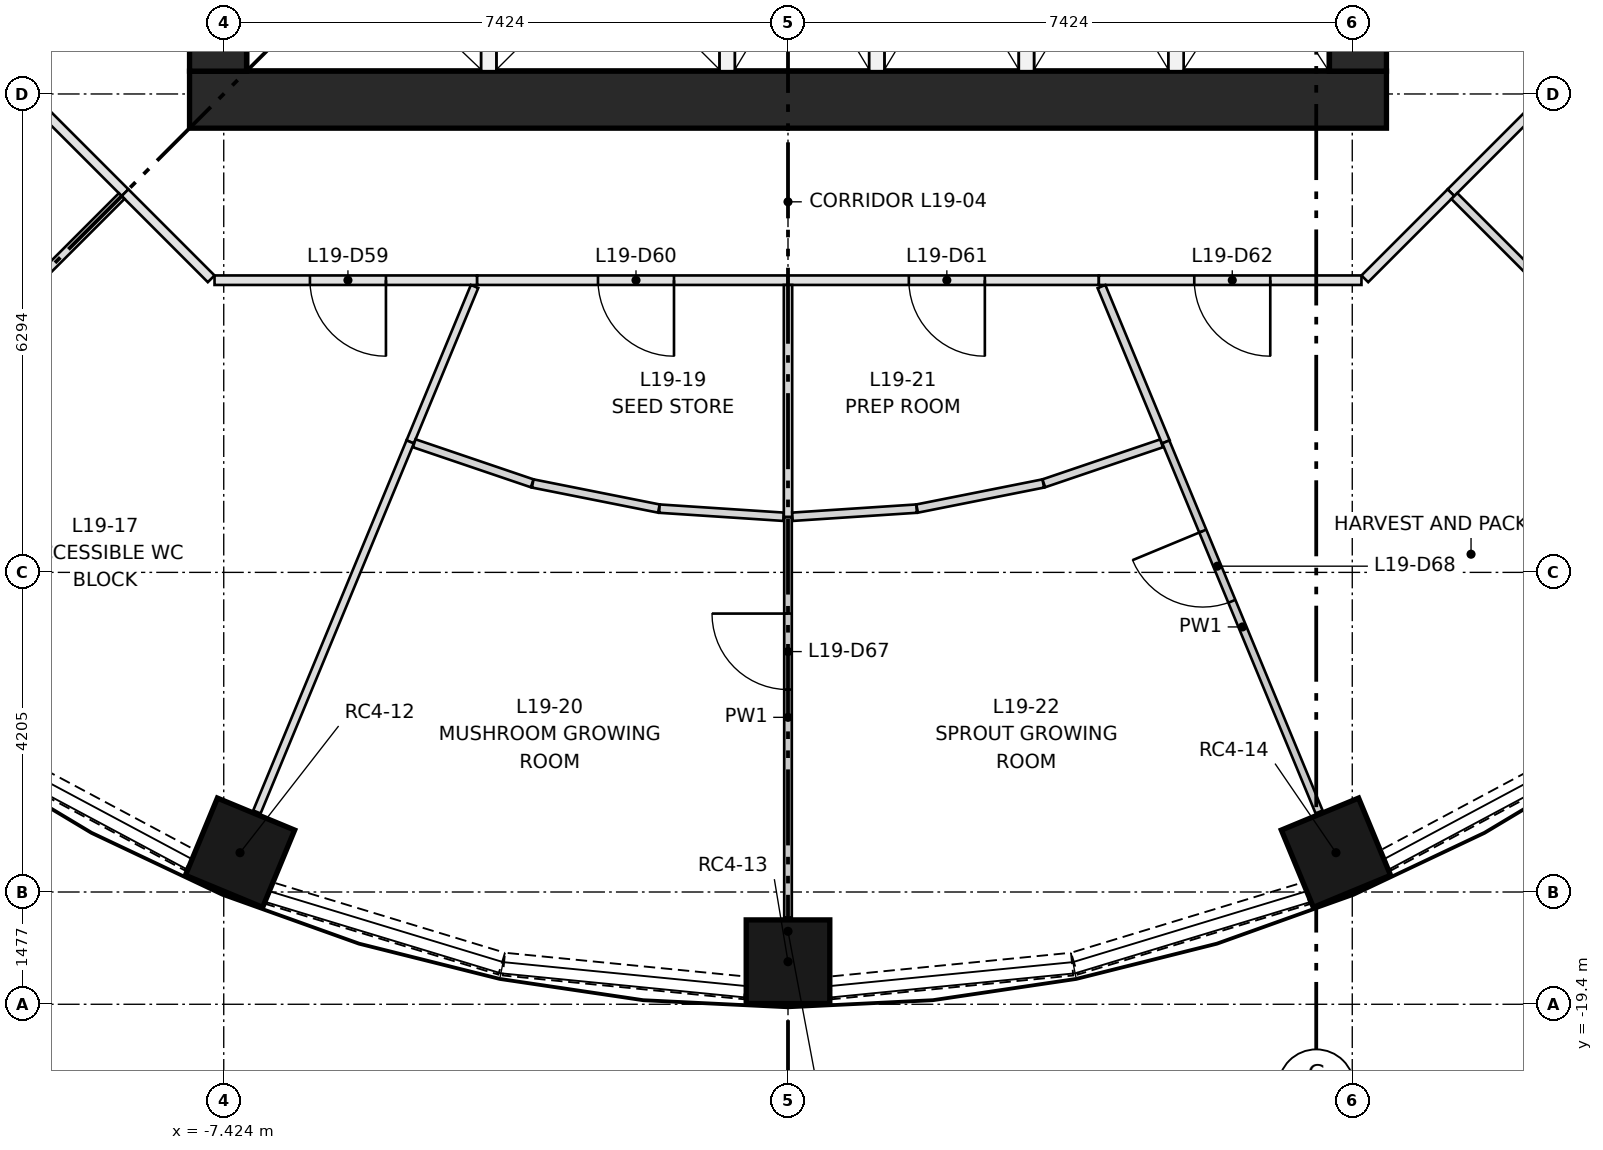
"""IFC4 building model, lengths in metres.
Left out: names, types, materials, properties, quantities, classifications, styles, units other than length and angle.
Written with IfcOpenShell. Run it as: python <this file> out.ifc"""

import sys

from ifc_helpers import new_model, si_unit, direction, frame, frame_2d, origin, origin_2d, place, context, subcontext, project, spatial, rectangle, extrude, element, fill, save


model = new_model("IFC4")
c1 = context("Model", 3, precision=1e-05, world=origin(), true_north=direction((0.0, 1.0)))
c2 = subcontext(c1, "Body", "Model", "MODEL_VIEW")
j1 = project(units=[si_unit("LENGTHUNIT", "METRE"), si_unit("PLANEANGLEUNIT", "RADIAN")], contexts=[c1])
p1 = place(None, origin())
s1 = spatial("IfcSite", under=j1, at=p1, CompositionType="ELEMENT")
p2 = place(p1, origin())
s2 = spatial("IfcBuilding", under=s1, at=p2, CompositionType="ELEMENT")
p3 = place(p2, frame((0.0, 0.0, 76.4)))
s3 = spatial("IfcBuildingStorey", under=s2, at=p3, CompositionType="ELEMENT", Elevation=76.4)
for number, where, z_axis, x_axis in (
    (1, (-7.21, -17.406, 0.0), (0.0, 0.0, 1.0), (-0.383, -0.924, 0.0)),
    (2, (0.0, -18.84, 0.0), (0.0, 0.0, 1.0), (0.0, -1.0, 0.0)),
    (3, (7.21, -17.406, 0.0), (0.0, 0.0, 1.0), (0.383, -0.924, 0.0)),
):
    element("IfcColumn", number, at=place(p3, frame(where, z_axis=z_axis, x_axis=x_axis)), inside=s3, PredefinedType="COLUMN", context=c2, shape_type="SweptSolid", body=[
        extrude(rectangle(XDim=1.1, YDim=1.1, at=origin_2d()), origin(), (0.0, 0.0, 1.0), 3.65),
    ])
p4 = place(p3, frame((-7.874, -7.499, 0.0), z_axis=(0.0, 0.0, 1.0), x_axis=(1.0, 0.0, 0.0)))
e4 = element("IfcWall", 4, at=p4, inside=s3, PredefinedType="SHEAR", context=c2, shape_type="SweptSolid", body=[
    extrude(rectangle(XDim=15.748, YDim=0.75, at=frame_2d((7.874, 0.0))), origin(), (0.0, 0.0, 1.0), 3.65),
])
p5 = place(p3, frame((-7.499, -7.124, 0.0), z_axis=(0.0, 0.0, 1.0), x_axis=(0.0, 1.0, 0.0)))
e5 = element("IfcWall", 5, at=p5, inside=s3, PredefinedType="SHEAR", context=c2, shape_type="SweptSolid", body=[
    extrude(rectangle(XDim=14.248, YDim=0.75, at=frame_2d((7.124, 0.0))), origin(), (0.0, 0.0, 1.0), 3.65),
])
p6 = place(p5, frame((6.624, 0.0, 0.0)))
e6 = element("IfcOpeningElement", 6, at=p6, cuts=e5, PredefinedType="OPENING", context=c2, shape_type="SweptSolid", body=[
    extrude(rectangle(XDim=1.0, YDim=2.1, at=frame_2d((0.5, 1.05))), frame((0.0, 0.385, 0.0), z_axis=(0.0, -1.0, 0.0), x_axis=(1.0, 0.0, 0.0)), (0.0, 0.0, 1.0), 0.77),
])
p7 = place(p5, frame((3.5, 0.0, 0.0)))
e7 = element("IfcOpeningElement", 7, at=p7, cuts=e5, PredefinedType="OPENING", context=c2, shape_type="SweptSolid", body=[
    extrude(rectangle(XDim=1.8, YDim=2.1, at=frame_2d((0.9, 1.05))), frame((0.0, 0.385, 0.0), z_axis=(0.0, -1.0, 0.0), x_axis=(1.0, 0.0, 0.0)), (0.0, 0.0, 1.0), 0.77),
])
p8 = place(p5, frame((8.948, 0.0, 0.0)))
e8 = element("IfcOpeningElement", 8, at=p8, cuts=e5, PredefinedType="OPENING", context=c2, shape_type="SweptSolid", body=[
    extrude(rectangle(XDim=1.8, YDim=2.1, at=frame_2d((0.9, 1.05))), frame((0.0, 0.385, 0.0), z_axis=(0.0, -1.0, 0.0), x_axis=(1.0, 0.0, 0.0)), (0.0, 0.0, 1.0), 0.77),
])
p9 = place(p5, frame((12.124, 0.0, 0.0)))
e9 = element("IfcOpeningElement", 9, at=p9, cuts=e5, PredefinedType="OPENING", context=c2, shape_type="SweptSolid", body=[
    extrude(rectangle(XDim=1.0, YDim=2.1, at=frame_2d((0.5, 1.05))), frame((0.0, 0.385, 0.0), z_axis=(0.0, -1.0, 0.0), x_axis=(1.0, 0.0, 0.0)), (0.0, 0.0, 1.0), 0.77),
])
p10 = place(p3, frame((7.499, -7.124, 0.0), z_axis=(0.0, 0.0, 1.0), x_axis=(0.0, 1.0, 0.0)))
e10 = element("IfcWall", 10, at=p10, inside=s3, PredefinedType="SHEAR", context=c2, shape_type="SweptSolid", body=[
    extrude(rectangle(XDim=14.248, YDim=0.75, at=frame_2d((7.124, 0.0))), origin(), (0.0, 0.0, 1.0), 3.65),
])
p11 = place(p10, frame((6.624, 0.0, 0.0)))
e11 = element("IfcOpeningElement", 11, at=p11, cuts=e10, PredefinedType="OPENING", context=c2, shape_type="SweptSolid", body=[
    extrude(rectangle(XDim=1.0, YDim=2.1, at=frame_2d((0.5, 1.05))), frame((0.0, 0.385, 0.0), z_axis=(0.0, -1.0, 0.0), x_axis=(1.0, 0.0, 0.0)), (0.0, 0.0, 1.0), 0.77),
])
p12 = place(p10, frame((3.5, 0.0, 0.0)))
e12 = element("IfcOpeningElement", 12, at=p12, cuts=e10, PredefinedType="OPENING", context=c2, shape_type="SweptSolid", body=[
    extrude(rectangle(XDim=1.8, YDim=2.1, at=frame_2d((0.9, 1.05))), frame((0.0, 0.385, 0.0), z_axis=(0.0, -1.0, 0.0), x_axis=(1.0, 0.0, 0.0)), (0.0, 0.0, 1.0), 0.77),
])
p13 = place(p10, frame((8.948, 0.0, 0.0)))
e13 = element("IfcOpeningElement", 13, at=p13, cuts=e10, PredefinedType="OPENING", context=c2, shape_type="SweptSolid", body=[
    extrude(rectangle(XDim=1.8, YDim=2.1, at=frame_2d((0.9, 1.05))), frame((0.0, 0.385, 0.0), z_axis=(0.0, -1.0, 0.0), x_axis=(1.0, 0.0, 0.0)), (0.0, 0.0, 1.0), 0.77),
])
for number, where, z_axis, x_axis in (
    (14, (-3.937, -7.124, 0.0), (0.0, 0.0, 1.0), (0.0, 1.0, 0.0)),
    (15, (-0.8, -7.124, 0.0), (0.0, 0.0, 1.0), (0.0, 1.0, 0.0)),
    (16, (1.168, -7.124, 0.0), (0.0, 0.0, 1.0), (0.0, 1.0, 0.0)),
    (17, (3.137, -7.124, 0.0), (0.0, 0.0, 1.0), (0.0, 1.0, 0.0)),
    (18, (5.105, -7.124, 0.0), (0.0, 0.0, 1.0), (0.0, 1.0, 0.0)),
):
    element("IfcWall", number, at=place(p3, frame(where, z_axis=z_axis, x_axis=x_axis)), inside=s3, PredefinedType="PARTITIONING", context=c2, shape_type="SweptSolid", body=[
        extrude(rectangle(XDim=2.95, YDim=0.2, at=frame_2d((1.475, 0.0))), origin(), (0.0, 0.0, 1.0), 3.3),
    ])
p14 = place(p3, frame((-10.676, -16.004, 0.0), z_axis=(0.0, 0.0, 1.0), x_axis=(0.8819437364, -0.471354692163, 0.0)))
e19 = element("IfcWall", 19, at=p14, inside=s3, PredefinedType="SOLIDWALL", context=c2, shape_type="SweptSolid", body=[
    extrude(rectangle(XDim=3.19, YDim=0.3, at=frame_2d((1.595, 0.0))), origin(), (0.0, 0.0, 1.0), 0.9),
])
p15 = place(p3, frame((-6.821, -17.939, 0.0), z_axis=(0.0, 0.0, 1.0), x_axis=(0.956954228099, -0.290238876314, 0.0)))
e20 = element("IfcWall", 20, at=p15, inside=s3, PredefinedType="SOLIDWALL", context=c2, shape_type="SweptSolid", body=[
    extrude(rectangle(XDim=3.191, YDim=0.3, at=frame_2d((1.595, 0.0))), origin(), (0.0, 0.0, 1.0), 0.9),
])
for number, where, z_axis, x_axis in (
    (21, (-3.738, -18.872, 0.0), (0.0, 0.0, 1.0), (0.995, -0.098, 0.0)),
    (22, (0.564, -19.185, 0.0), (0.0, 0.0, 1.0), (0.995, 0.098, 0.0)),
):
    element("IfcWall", number, at=place(p3, frame(where, z_axis=z_axis, x_axis=x_axis)), inside=s3, PredefinedType="SOLIDWALL", context=c2, shape_type="SweptSolid", body=[
        extrude(rectangle(XDim=3.189, YDim=0.3, at=frame_2d((1.595, 0.0))), origin(), (0.0, 0.0, 1.0), 0.9),
    ])
p16 = place(p3, frame((3.767, -18.865, 0.0), z_axis=(0.0, 0.0, 1.0), x_axis=(0.956954228099, 0.290238876314, 0.0)))
e23 = element("IfcWall", 23, at=p16, inside=s3, PredefinedType="SOLIDWALL", context=c2, shape_type="SweptSolid", body=[
    extrude(rectangle(XDim=3.191, YDim=0.3, at=frame_2d((1.595, 0.0))), origin(), (0.0, 0.0, 1.0), 0.9),
])
p17 = place(p3, frame((7.862, -17.508, 0.0), z_axis=(0.0, 0.0, 1.0), x_axis=(0.8819437364, 0.471354692163, 0.0)))
e24 = element("IfcWall", 24, at=p17, inside=s3, PredefinedType="SOLIDWALL", context=c2, shape_type="SweptSolid", body=[
    extrude(rectangle(XDim=3.19, YDim=0.3, at=frame_2d((1.595, 0.0))), origin(), (0.0, 0.0, 1.0), 0.9),
])
for number, where, z_axis, x_axis in (
    (25, (9.856, -7.589, 0.0), (0.0, 0.0, 1.0), (-0.707, -0.707, 0.0)),
    (26, (-8.722, -8.722, 0.0), (0.0, 0.0, 1.0), (-0.707, 0.707, 0.0)),
    (27, (-7.589, -9.856, 0.0), (0.0, 0.0, 1.0), (-0.707, 0.707, 0.0)),
):
    element("IfcWall", number, at=place(p3, frame(where, z_axis=z_axis, x_axis=x_axis)), inside=s3, PredefinedType="PARTITIONING", context=c2, shape_type="SweptSolid", body=[
        extrude(rectangle(XDim=1.603, YDim=0.125, at=frame_2d((0.801, 0.0))), origin(), (0.0, 0.0, 1.0), 3.3),
    ])
p18 = place(p3, frame((-4.09, -9.874, 0.0), z_axis=(0.0, 0.0, 1.0), x_axis=(-1.0, 0.0, 0.0)))
e28 = element("IfcWall", 28, at=p18, inside=s3, PredefinedType="PARTITIONING", context=c2, shape_type="SweptSolid", body=[
    extrude(rectangle(XDim=3.455, YDim=0.125, at=frame_2d((1.728, 0.0))), origin(), (0.0, 0.0, 1.0), 3.3),
])
p19 = place(p18, frame((1.2, 0.0, 0.0)))
e29 = element("IfcOpeningElement", 29, at=p19, cuts=e28, PredefinedType="OPENING", context=c2, shape_type="SweptSolid", body=[
    extrude(rectangle(XDim=1.0, YDim=2.1, at=frame_2d((0.5, 1.05))), frame((0.0, 0.073, 0.0), z_axis=(0.0, -1.0, 0.0), x_axis=(1.0, 0.0, 0.0)), (0.0, 0.0, 1.0), 0.145),
])
p20 = place(p3, frame((0.0, -9.874, 0.0), z_axis=(0.0, 0.0, 1.0), x_axis=(-1.0, 0.0, 0.0)))
e30 = element("IfcWall", 30, at=p20, inside=s3, PredefinedType="PARTITIONING", context=c2, shape_type="SweptSolid", body=[
    extrude(rectangle(XDim=4.09, YDim=0.125, at=frame_2d((2.045, 0.0))), origin(), (0.0, 0.0, 1.0), 3.3),
])
p21 = place(p20, frame((1.5, 0.0, 0.0)))
e31 = element("IfcOpeningElement", 31, at=p21, cuts=e30, PredefinedType="OPENING", context=c2, shape_type="SweptSolid", body=[
    extrude(rectangle(XDim=1.0, YDim=2.1, at=frame_2d((0.5, 1.05))), frame((0.0, 0.073, 0.0), z_axis=(0.0, -1.0, 0.0), x_axis=(1.0, 0.0, 0.0)), (0.0, 0.0, 1.0), 0.145),
])
p22 = place(p3, frame((4.09, -9.874, 0.0), z_axis=(0.0, 0.0, 1.0), x_axis=(-1.0, 0.0, 0.0)))
e32 = element("IfcWall", 32, at=p22, inside=s3, PredefinedType="PARTITIONING", context=c2, shape_type="SweptSolid", body=[
    extrude(rectangle(XDim=4.09, YDim=0.125, at=frame_2d((2.045, 0.0))), origin(), (0.0, 0.0, 1.0), 3.3),
])
p23 = place(p22, frame((1.5, 0.0, 0.0)))
e33 = element("IfcOpeningElement", 33, at=p23, cuts=e32, PredefinedType="OPENING", context=c2, shape_type="SweptSolid", body=[
    extrude(rectangle(XDim=1.0, YDim=2.1, at=frame_2d((0.5, 1.05))), frame((0.0, 0.073, 0.0), z_axis=(0.0, -1.0, 0.0), x_axis=(1.0, 0.0, 0.0)), (0.0, 0.0, 1.0), 0.145),
])
p24 = place(p3, frame((7.545, -9.874, 0.0), z_axis=(0.0, 0.0, 1.0), x_axis=(-1.0, 0.0, 0.0)))
e34 = element("IfcWall", 34, at=p24, inside=s3, PredefinedType="PARTITIONING", context=c2, shape_type="SweptSolid", body=[
    extrude(rectangle(XDim=3.455, YDim=0.125, at=frame_2d((1.728, 0.0))), origin(), (0.0, 0.0, 1.0), 3.3),
])
p25 = place(p24, frame((1.2, 0.0, 0.0)))
e35 = element("IfcOpeningElement", 35, at=p25, cuts=e34, PredefinedType="OPENING", context=c2, shape_type="SweptSolid", body=[
    extrude(rectangle(XDim=1.0, YDim=2.1, at=frame_2d((0.5, 1.05))), frame((0.0, 0.073, 0.0), z_axis=(0.0, -1.0, 0.0), x_axis=(1.0, 0.0, 0.0)), (0.0, 0.0, 1.0), 0.145),
])
p26 = place(p3, frame((8.722, -8.722, 0.0), z_axis=(0.0, 0.0, 1.0), x_axis=(-0.707030604857, -0.70718294931, 0.0)))
e36 = element("IfcWall", 36, at=p26, inside=s3, PredefinedType="PARTITIONING", context=c2, shape_type="SweptSolid", body=[
    extrude(rectangle(XDim=1.603, YDim=0.125, at=frame_2d((0.801, 0.0))), origin(), (0.0, 0.0, 1.0), 3.3),
])
p27 = place(p3, frame((-12.912, -12.912, 0.0), z_axis=(0.0, 0.0, 1.0), x_axis=(0.707106781187, 0.707106781187, 0.0)))
e37 = element("IfcWall", 37, at=p27, inside=s3, PredefinedType="PARTITIONING", context=c2, shape_type="SweptSolid", body=[
    extrude(rectangle(XDim=5.862, YDim=0.105, at=frame_2d((2.931, 0.0))), origin(), (0.0, 0.0, 1.0), 3.3),
])
p28 = place(p3, frame((-4.124, -9.957, 0.0), z_axis=(0.0, 0.0, 1.0), x_axis=(-0.382679799248, -0.923881037389, 0.0)))
e38 = element("IfcWall", 38, at=p28, inside=s3, PredefinedType="PARTITIONING", context=c2, shape_type="SweptSolid", body=[
    extrude(rectangle(XDim=2.213, YDim=0.105, at=frame_2d((1.106, 0.0))), origin(), (0.0, 0.0, 1.0), 3.3),
])
p29 = place(p3, frame((-4.971, -12.001, 0.0), z_axis=(0.0, 0.0, 1.0), x_axis=(-0.382696833945, -0.923873981281, 0.0)))
e39 = element("IfcWall", 39, at=p29, inside=s3, PredefinedType="PARTITIONING", context=c2, shape_type="SweptSolid", body=[
    extrude(rectangle(XDim=5.27, YDim=0.105, at=frame_2d((2.635, 0.0))), origin(), (0.0, 0.0, 1.0), 3.3),
])
p30 = place(p3, frame((-3.365, -12.546, 0.0), z_axis=(0.0, 0.0, 1.0), x_axis=(-0.946941470356, 0.321406054267, 0.0)))
e40 = element("IfcWall", 40, at=p30, inside=s3, PredefinedType="PARTITIONING", context=c2, shape_type="SweptSolid", body=[
    extrude(rectangle(XDim=1.639, YDim=0.11, at=frame_2d((0.82, 0.0))), origin(), (0.0, 0.0, 1.0), 3.3),
])
p31 = place(p3, frame((-1.699, -12.878, 0.0), z_axis=(0.0, 0.0, 1.0), x_axis=(-0.98079097439, 0.19506169423, 0.0)))
e41 = element("IfcWall", 41, at=p31, inside=s3, PredefinedType="PARTITIONING", context=c2, shape_type="SweptSolid", body=[
    extrude(rectangle(XDim=1.692, YDim=0.11, at=frame_2d((0.846, 0.0))), origin(), (0.0, 0.0, 1.0), 3.3),
])
p32 = place(p3, frame((-0.059, -12.986, 0.0), z_axis=(0.0, 0.0, 1.0), x_axis=(-0.997863649312, 0.065330983318, 0.0)))
e42 = element("IfcWall", 42, at=p32, inside=s3, PredefinedType="PARTITIONING", context=c2, shape_type="SweptSolid", body=[
    extrude(rectangle(XDim=1.637, YDim=0.11, at=frame_2d((0.818, 0.0))), origin(), (0.0, 0.0, 1.0), 3.3),
])
p33 = place(p3, frame((0.0, -9.937, 0.0), z_axis=(0.0, 0.0, 1.0), x_axis=(0.0, -1.0, 0.0)))
e43 = element("IfcWall", 43, at=p33, inside=s3, PredefinedType="PARTITIONING", context=c2, shape_type="SweptSolid", body=[
    extrude(rectangle(XDim=3.053, YDim=0.11, at=frame_2d((1.527, 0.0))), origin(), (0.0, 0.0, 1.0), 3.3),
])
p34 = place(p3, frame((0.0, -18.26, 0.0), z_axis=(0.0, 0.0, 1.0), x_axis=(0.0, 1.0, 0.0)))
e44 = element("IfcWall", 44, at=p34, inside=s3, PredefinedType="PARTITIONING", context=c2, shape_type="SweptSolid", body=[
    extrude(rectangle(XDim=5.27, YDim=0.1, at=frame_2d((2.635, 0.0))), origin(), (0.0, 0.0, 1.0), 3.3),
])
p35 = place(p34, frame((3.0, 0.0, 0.0)))
e45 = element("IfcOpeningElement", 45, at=p35, cuts=e44, PredefinedType="OPENING", context=c2, shape_type="SweptSolid", body=[
    extrude(rectangle(XDim=1.0, YDim=2.1, at=frame_2d((0.5, 1.05))), frame((0.0, 0.06, 0.0), z_axis=(0.0, -1.0, 0.0), x_axis=(1.0, 0.0, 0.0)), (0.0, 0.0, 1.0), 0.12),
])
p36 = place(p3, frame((1.692, -12.879, 0.0), z_axis=(0.0, 0.0, 1.0), x_axis=(-0.997863649312, -0.065330983318, 0.0)))
e46 = element("IfcWall", 46, at=p36, inside=s3, PredefinedType="PARTITIONING", context=c2, shape_type="SweptSolid", body=[
    extrude(rectangle(XDim=1.637, YDim=0.11, at=frame_2d((0.818, 0.0))), origin(), (0.0, 0.0, 1.0), 3.3),
])
p37 = place(p3, frame((3.359, -12.548, 0.0), z_axis=(0.0, 0.0, 1.0), x_axis=(-0.98079097439, -0.19506169423, 0.0)))
e47 = element("IfcWall", 47, at=p37, inside=s3, PredefinedType="PARTITIONING", context=c2, shape_type="SweptSolid", body=[
    extrude(rectangle(XDim=1.692, YDim=0.11, at=frame_2d((0.846, 0.0))), origin(), (0.0, 0.0, 1.0), 3.3),
])
p38 = place(p3, frame((4.915, -12.02, 0.0), z_axis=(0.0, 0.0, 1.0), x_axis=(-0.946923574546, -0.321458774913, 0.0)))
e48 = element("IfcWall", 48, at=p38, inside=s3, PredefinedType="PARTITIONING", context=c2, shape_type="SweptSolid", body=[
    extrude(rectangle(XDim=1.637, YDim=0.11, at=frame_2d((0.818, 0.0))), origin(), (0.0, 0.0, 1.0), 3.3),
])
p39 = place(p3, frame((4.125, -9.958, 0.0), z_axis=(0.0, 0.0, 1.0), x_axis=(0.382647470997, -0.923894427378, 0.0)))
e49 = element("IfcWall", 49, at=p39, inside=s3, PredefinedType="PARTITIONING", context=c2, shape_type="SweptSolid", body=[
    extrude(rectangle(XDim=2.212, YDim=0.11, at=frame_2d((1.106, 0.0))), origin(), (0.0, 0.0, 1.0), 3.3),
])
p40 = place(p3, frame((6.988, -16.87, 0.0), z_axis=(0.0, 0.0, 1.0), x_axis=(-0.382657291887, 0.923890359819, 0.0)))
e50 = element("IfcWall", 50, at=p40, inside=s3, PredefinedType="PARTITIONING", context=c2, shape_type="SweptSolid", body=[
    extrude(rectangle(XDim=5.27, YDim=0.1, at=frame_2d((2.635, 0.0))), origin(), (0.0, 0.0, 1.0), 3.3),
])
p41 = place(p40, frame((3.0, 0.0, 0.0)))
e51 = element("IfcOpeningElement", 51, at=p41, cuts=e50, PredefinedType="OPENING", context=c2, shape_type="SweptSolid", body=[
    extrude(rectangle(XDim=1.0, YDim=2.1, at=frame_2d((0.5, 1.05))), frame((0.0, 0.06, 0.0), z_axis=(0.0, -1.0, 0.0), x_axis=(1.0, 0.0, 0.0)), (0.0, 0.0, 1.0), 0.12),
])
p42 = place(p3, frame((8.767, -8.767, 0.0), z_axis=(0.0, 0.0, 1.0), x_axis=(0.707106781187, -0.707106781187, 0.0)))
e52 = element("IfcWall", 52, at=p42, inside=s3, PredefinedType="PARTITIONING", context=c2, shape_type="SweptSolid", body=[
    extrude(rectangle(XDim=5.862, YDim=0.11, at=frame_2d((2.931, 0.0))), origin(), (0.0, 0.0, 1.0), 3.3),
])
p43 = place(p19, origin())
e53 = element("IfcDoor", 53, at=p43, inside=s3, OperationType="SINGLE_SWING_LEFT", PredefinedType="DOOR", context=c2, shape_type="SweptSolid", body=[
    extrude(rectangle(XDim=1.0, YDim=2.1, at=frame_2d((0.5, 1.05))), frame((0.0, 0.025, 0.0), z_axis=(0.0, -1.0, 0.0), x_axis=(1.0, 0.0, 0.0)), (0.0, 0.0, 1.0), 0.05),
])
fill(e29, e53)
p44 = place(p21, origin())
e54 = element("IfcDoor", 54, at=p44, inside=s3, OperationType="SINGLE_SWING_LEFT", PredefinedType="DOOR", context=c2, shape_type="SweptSolid", body=[
    extrude(rectangle(XDim=1.0, YDim=2.1, at=frame_2d((0.5, 1.05))), frame((0.0, 0.025, 0.0), z_axis=(0.0, -1.0, 0.0), x_axis=(1.0, 0.0, 0.0)), (0.0, 0.0, 1.0), 0.05),
])
fill(e31, e54)
p45 = place(p23, origin())
e55 = element("IfcDoor", 55, at=p45, inside=s3, OperationType="SINGLE_SWING_LEFT", PredefinedType="DOOR", context=c2, shape_type="SweptSolid", body=[
    extrude(rectangle(XDim=1.0, YDim=2.1, at=frame_2d((0.5, 1.05))), frame((0.0, 0.025, 0.0), z_axis=(0.0, -1.0, 0.0), x_axis=(1.0, 0.0, 0.0)), (0.0, 0.0, 1.0), 0.05),
])
fill(e33, e55)
p46 = place(p25, origin())
e56 = element("IfcDoor", 56, at=p46, inside=s3, OperationType="SINGLE_SWING_LEFT", PredefinedType="DOOR", context=c2, shape_type="SweptSolid", body=[
    extrude(rectangle(XDim=1.0, YDim=2.1, at=frame_2d((0.5, 1.05))), frame((0.0, 0.025, 0.0), z_axis=(0.0, -1.0, 0.0), x_axis=(1.0, 0.0, 0.0)), (0.0, 0.0, 1.0), 0.05),
])
fill(e35, e56)
p47 = place(p35, origin())
e57 = element("IfcDoor", 57, at=p47, inside=s3, OperationType="SINGLE_SWING_RIGHT", PredefinedType="DOOR", context=c2, shape_type="SweptSolid", body=[
    extrude(rectangle(XDim=1.0, YDim=2.1, at=frame_2d((0.5, 1.05))), frame((0.0, 0.025, 0.0), z_axis=(0.0, -1.0, 0.0), x_axis=(1.0, 0.0, 0.0)), (0.0, 0.0, 1.0), 0.05),
])
fill(e45, e57)
p48 = place(p41, origin())
e58 = element("IfcDoor", 58, at=p48, inside=s3, OperationType="SINGLE_SWING_RIGHT", PredefinedType="DOOR", context=c2, shape_type="SweptSolid", body=[
    extrude(rectangle(XDim=1.0, YDim=2.1, at=frame_2d((0.5, 1.05))), frame((0.0, 0.025, 0.0), z_axis=(0.0, -1.0, 0.0), x_axis=(1.0, 0.0, 0.0)), (0.0, 0.0, 1.0), 0.05),
])
fill(e51, e58)
save(model, sys.argv[1])
